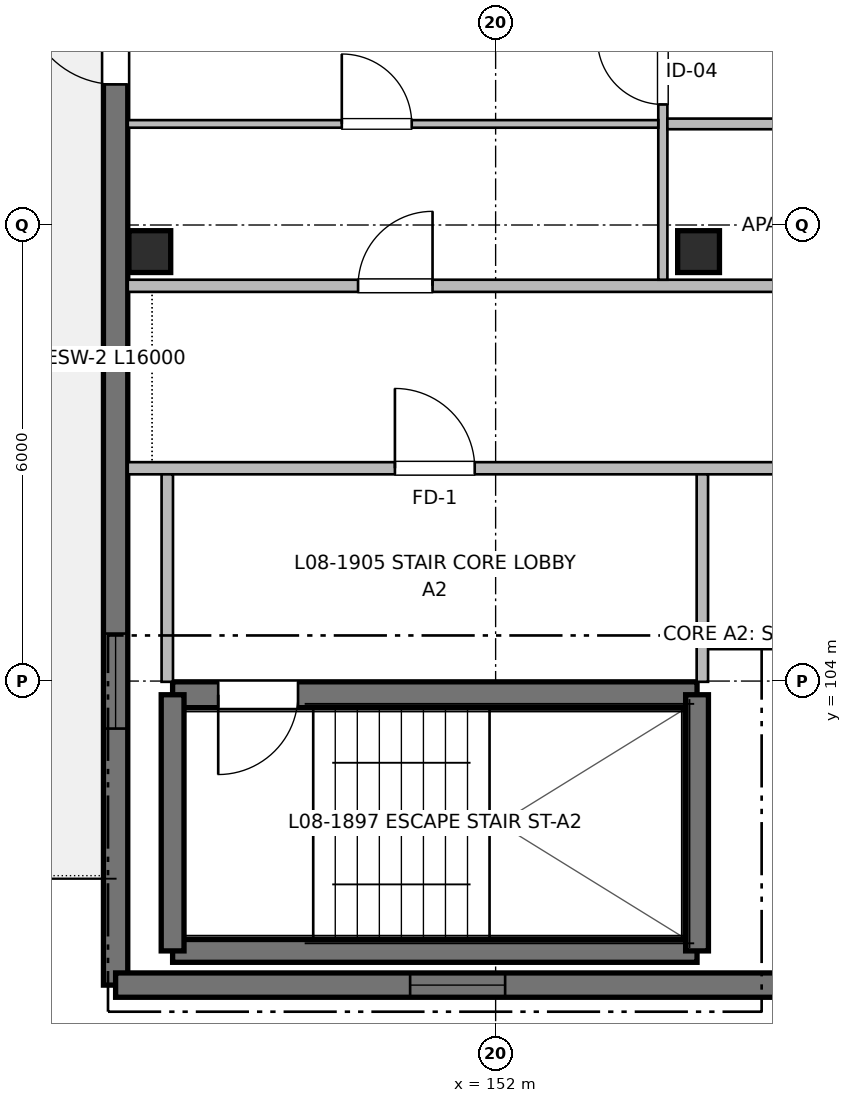
"""IFC4 building model, lengths in metres.
Left out: names, types, materials, properties, quantities, classifications, styles, units other than length and angle.
Written with IfcOpenShell. Run it as: python <this file> out.ifc"""

import sys

from ifc_helpers import new_model, si_unit, direction, frame, frame_2d, origin, origin_2d, place, context, subcontext, project, spatial, rectangle, extrude, element, fill, save


model = new_model("IFC4")
c1 = context("Model", 3, precision=1e-05, world=origin(), true_north=direction((0.0, 1.0)))
c2 = subcontext(c1, "Body", "Model", "MODEL_VIEW")
j1 = project(units=[si_unit("LENGTHUNIT", "METRE"), si_unit("PLANEANGLEUNIT", "RADIAN")], contexts=[c1])
p1 = place(None, origin())
s1 = spatial("IfcSite", under=j1, at=p1, CompositionType="ELEMENT")
p2 = place(p1, origin())
s2 = spatial("IfcBuilding", under=s1, at=p2, CompositionType="ELEMENT")
p3 = place(p2, frame((0.0, 0.0, 26.56)))
s3 = spatial("IfcBuildingStorey", under=s2, at=p3, CompositionType="ELEMENT", Elevation=26.56)
for number, where, z_axis, x_axis in (
    (1, (147.45, 109.65, 0.0), (0.0, 0.0, 1.0), (1.0, 0.0, 0.0)),
    (2, (154.67, 109.65, 0.0), (0.0, 0.0, 1.0), (1.0, 0.0, 0.0)),
):
    element("IfcColumn", number, at=place(p3, frame(where, z_axis=z_axis, x_axis=x_axis)), inside=s3, PredefinedType="COLUMN", context=c2, shape_type="SweptSolid", body=[
        extrude(rectangle(XDim=0.55, YDim=0.55, at=origin_2d()), origin(), (0.0, 0.0, 1.0), 3.2),
    ])
p4 = place(p3, frame((147.75, 100.45, 0.0), z_axis=(0.0, 0.0, 1.0), x_axis=(1.0, 0.0, 0.0)))
e3 = element("IfcWall", 3, at=p4, inside=s3, PredefinedType="SHEAR", context=c2, shape_type="SweptSolid", body=[
    extrude(rectangle(XDim=6.9, YDim=0.3, at=frame_2d((3.45, 0.0))), origin(), (0.0, 0.0, 1.0), 3.2),
])
p5 = place(p3, frame((154.65, 103.82, 0.0), z_axis=(0.0, 0.0, 1.0), x_axis=(-1.0, 0.0, 0.0)))
e4 = element("IfcWall", 4, at=p5, inside=s3, PredefinedType="SHEAR", context=c2, shape_type="SweptSolid", body=[
    extrude(rectangle(XDim=6.9, YDim=0.34, at=frame_2d((3.45, 0.0))), origin(), (0.0, 0.0, 1.0), 3.2),
])
p6 = place(p5, frame((5.25, 0.0, 0.0)))
e5 = element("IfcOpeningElement", 5, at=p6, cuts=e4, PredefinedType="OPENING", context=c2, shape_type="SweptSolid", body=[
    extrude(rectangle(XDim=1.05, YDim=2.15, at=frame_2d((0.525, 1.075))), frame((0.0, 0.18, 0.0), z_axis=(0.0, -1.0, 0.0), x_axis=(1.0, 0.0, 0.0)), (0.0, 0.0, 1.0), 0.36),
])
for number, where, z_axis, x_axis in (
    (6, (147.75, 103.82, 0.0), (0.0, 0.0, 1.0), (0.0, -1.0, 0.0)),
    (7, (154.65, 100.45, 0.0), (0.0, 0.0, 1.0), (0.0, 1.0, 0.0)),
):
    element("IfcWall", number, at=place(p3, frame(where, z_axis=z_axis, x_axis=x_axis)), inside=s3, PredefinedType="SHEAR", context=c2, shape_type="SweptSolid", body=[
        extrude(rectangle(XDim=3.37, YDim=0.3, at=frame_2d((1.685, 0.0))), origin(), (0.0, 0.0, 1.0), 3.2),
    ])
p7 = place(p3, frame((147.0, 100.0, 0.0), z_axis=(0.0, 0.0, 1.0), x_axis=(0.0, 1.0, 0.0)))
e8 = element("IfcWall", 8, at=p7, inside=s3, PredefinedType="SHEAR", context=c2, shape_type="SweptSolid", body=[
    extrude(rectangle(XDim=16.0, YDim=0.32, at=frame_2d((8.0, 0.0))), origin(), (0.0, 0.0, 1.0), 2.98),
])
p8 = place(p7, frame((3.375, 0.0, 0.87)))
e9 = element("IfcOpeningElement", 9, at=p8, cuts=e8, PredefinedType="OPENING", context=c2, shape_type="SweptSolid", body=[
    extrude(rectangle(XDim=1.25, YDim=1.35, at=frame_2d((0.625, 0.675))), frame((0.0, 0.17, 0.0), z_axis=(0.0, -1.0, 0.0), x_axis=(1.0, 0.0, 0.0)), (0.0, 0.0, 1.0), 0.34),
])
p9 = place(p7, frame((11.85, 0.0, 0.0)))
e10 = element("IfcOpeningElement", 10, at=p9, cuts=e8, PredefinedType="OPENING", context=c2, shape_type="SweptSolid", body=[
    extrude(rectangle(XDim=1.2, YDim=2.2, at=frame_2d((0.6, 1.1))), frame((0.0, 0.17, 0.0), z_axis=(0.0, -1.0, 0.0), x_axis=(1.0, 0.0, 0.0)), (0.0, 0.0, 1.0), 0.34),
])
p10 = place(p3, frame((156.0, 100.0, 0.0), z_axis=(0.0, 0.0, 1.0), x_axis=(-1.0, 0.0, 0.0)))
e11 = element("IfcWall", 11, at=p10, inside=s3, PredefinedType="SHEAR", context=c2, shape_type="SweptSolid", body=[
    extrude(rectangle(XDim=9.0, YDim=0.32, at=frame_2d((4.5, 0.0))), origin(), (0.0, 0.0, 1.0), 2.98),
])
p11 = place(p10, frame((3.875, 0.0, 0.87)))
e12 = element("IfcOpeningElement", 12, at=p11, cuts=e11, PredefinedType="OPENING", context=c2, shape_type="SweptSolid", body=[
    extrude(rectangle(XDim=1.25, YDim=1.35, at=frame_2d((0.625, 0.675))), frame((0.0, 0.17, 0.0), z_axis=(0.0, -1.0, 0.0), x_axis=(1.0, 0.0, 0.0)), (0.0, 0.0, 1.0), 0.34),
])
p12 = place(p3, frame((147.16, 106.8, 0.0), z_axis=(0.0, 0.0, 1.0), x_axis=(1.0, 0.0, 0.0)))
e13 = element("IfcWall", 13, at=p12, inside=s3, PredefinedType="PARTITIONING", context=c2, shape_type="SweptSolid", body=[
    extrude(rectangle(XDim=27.64, YDim=0.16, at=frame_2d((13.82, 0.0))), origin(), (0.0, 0.0, 1.0), 2.935),
])
p13 = place(p12, frame((3.515, 0.0, 0.0)))
e14 = element("IfcOpeningElement", 14, at=p13, cuts=e13, PredefinedType="OPENING", context=c2, shape_type="SweptSolid", body=[
    extrude(rectangle(XDim=1.05, YDim=2.15, at=frame_2d((0.525, 1.075))), frame((0.0, 0.09, 0.0), z_axis=(0.0, -1.0, 0.0), x_axis=(1.0, 0.0, 0.0)), (0.0, 0.0, 1.0), 0.18),
])
p14 = place(p12, frame((10.69, 0.0, 0.0)))
e15 = element("IfcOpeningElement", 15, at=p14, cuts=e13, PredefinedType="OPENING", context=c2, shape_type="SweptSolid", body=[
    extrude(rectangle(XDim=0.98, YDim=2.15, at=frame_2d((0.49, 1.075))), frame((0.0, 0.09, 0.0), z_axis=(0.0, -1.0, 0.0), x_axis=(1.0, 0.0, 0.0)), (0.0, 0.0, 1.0), 0.18),
])
p15 = place(p3, frame((147.16, 109.2, 0.0), z_axis=(0.0, 0.0, 1.0), x_axis=(1.0, 0.0, 0.0)))
e16 = element("IfcWall", 16, at=p15, inside=s3, PredefinedType="PARTITIONING", context=c2, shape_type="SweptSolid", body=[
    extrude(rectangle(XDim=36.68, YDim=0.16, at=frame_2d((18.34, 0.0))), origin(), (0.0, 0.0, 1.0), 2.935),
])
p16 = place(p15, frame((3.03, 0.0, 0.0)))
e17 = element("IfcOpeningElement", 17, at=p16, cuts=e16, PredefinedType="OPENING", context=c2, shape_type="SweptSolid", body=[
    extrude(rectangle(XDim=0.98, YDim=2.15, at=frame_2d((0.49, 1.075))), frame((0.0, 0.09, 0.0), z_axis=(0.0, -1.0, 0.0), x_axis=(1.0, 0.0, 0.0)), (0.0, 0.0, 1.0), 0.18),
])
p17 = place(p15, frame((15.72, 0.0, 0.0)))
e18 = element("IfcOpeningElement", 18, at=p17, cuts=e16, PredefinedType="OPENING", context=c2, shape_type="SweptSolid", body=[
    extrude(rectangle(XDim=0.98, YDim=2.15, at=frame_2d((0.49, 1.075))), frame((0.0, 0.09, 0.0), z_axis=(0.0, -1.0, 0.0), x_axis=(1.0, 0.0, 0.0)), (0.0, 0.0, 1.0), 0.18),
])
p18 = place(p15, frame((27.17, 0.0, 0.0)))
e19 = element("IfcOpeningElement", 19, at=p18, cuts=e16, PredefinedType="OPENING", context=c2, shape_type="SweptSolid", body=[
    extrude(rectangle(XDim=0.98, YDim=2.15, at=frame_2d((0.49, 1.075))), frame((0.0, 0.09, 0.0), z_axis=(0.0, -1.0, 0.0), x_axis=(1.0, 0.0, 0.0)), (0.0, 0.0, 1.0), 0.18),
])
for number, where, z_axis, x_axis in (
    (20, (147.68, 103.99, 0.0), (0.0, 0.0, 1.0), (0.0, 1.0, 0.0)),
    (21, (154.72, 103.99, 0.0), (0.0, 0.0, 1.0), (0.0, 1.0, 0.0)),
):
    element("IfcWall", number, at=place(p3, frame(where, z_axis=z_axis, x_axis=x_axis)), inside=s3, PredefinedType="PARTITIONING", context=c2, shape_type="SweptSolid", body=[
        extrude(rectangle(XDim=2.73, YDim=0.15, at=frame_2d((1.365, 0.0))), origin(), (0.0, 0.0, 1.0), 2.935),
    ])
p19 = place(p3, frame((154.2, 109.28, 0.0), z_axis=(0.0, 0.0, 1.0), x_axis=(0.0, 1.0, 0.0)))
e22 = element("IfcWall", 22, at=p19, inside=s3, PredefinedType="PARTITIONING", context=c2, shape_type="SweptSolid", body=[
    extrude(rectangle(XDim=6.6, YDim=0.12, at=frame_2d((3.3, 0.0))), origin(), (0.0, 0.0, 1.0), 2.935),
])
p20 = place(p19, frame((2.306, 0.0, 0.0)))
e23 = element("IfcOpeningElement", 23, at=p20, cuts=e22, PredefinedType="OPENING", context=c2, shape_type="SweptSolid", body=[
    extrude(rectangle(XDim=0.86, YDim=2.1, at=frame_2d((0.43, 1.05))), frame((0.0, 0.07, 0.0), z_axis=(0.0, -1.0, 0.0), x_axis=(1.0, 0.0, 0.0)), (0.0, 0.0, 1.0), 0.14),
])
p21 = place(p19, frame((4.097, 0.0, 0.0)))
e24 = element("IfcOpeningElement", 24, at=p21, cuts=e22, PredefinedType="OPENING", context=c2, shape_type="SweptSolid", body=[
    extrude(rectangle(XDim=0.9, YDim=2.1, at=frame_2d((0.45, 1.05))), frame((0.0, 0.07, 0.0), z_axis=(0.0, -1.0, 0.0), x_axis=(1.0, 0.0, 0.0)), (0.0, 0.0, 1.0), 0.14),
])
p22 = place(p3, frame((154.26, 111.33, 0.0), z_axis=(0.0, 0.0, 1.0), x_axis=(1.0, 0.0, 0.0)))
e25 = element("IfcWall", 25, at=p22, inside=s3, PredefinedType="PARTITIONING", context=c2, shape_type="SweptSolid", body=[
    extrude(rectangle(XDim=5.04, YDim=0.14, at=frame_2d((2.52, 0.0))), origin(), (0.0, 0.0, 1.0), 2.935),
])
p23 = place(p22, frame((2.04, 0.0, 0.0)))
e26 = element("IfcOpeningElement", 26, at=p23, cuts=e25, PredefinedType="OPENING", context=c2, shape_type="SweptSolid", body=[
    extrude(rectangle(XDim=0.85, YDim=2.05, at=frame_2d((0.425, 1.025))), frame((0.0, 0.08, 0.0), z_axis=(0.0, -1.0, 0.0), x_axis=(1.0, 0.0, 0.0)), (0.0, 0.0, 1.0), 0.16),
])
p24 = place(p3, frame((147.16, 111.33, 0.0), z_axis=(0.0, 0.0, 1.0), x_axis=(1.0, 0.0, 0.0)))
e27 = element("IfcWall", 27, at=p24, inside=s3, PredefinedType="PARTITIONING", context=c2, shape_type="SweptSolid", body=[
    extrude(rectangle(XDim=6.98, YDim=0.1, at=frame_2d((3.49, 0.0))), origin(), (0.0, 0.0, 1.0), 2.935),
])
p25 = place(p24, frame((2.816, 0.0, 0.0)))
e28 = element("IfcOpeningElement", 28, at=p25, cuts=e27, PredefinedType="OPENING", context=c2, shape_type="SweptSolid", body=[
    extrude(rectangle(XDim=0.92, YDim=2.1, at=frame_2d((0.46, 1.05))), frame((0.0, 0.06, 0.0), z_axis=(0.0, -1.0, 0.0), x_axis=(1.0, 0.0, 0.0)), (0.0, 0.0, 1.0), 0.12),
])
p26 = place(p3, frame((154.8, 104.47, 0.0), z_axis=(0.0, 0.0, 1.0), x_axis=(1.0, 0.0, 0.0)))
e29 = element("IfcWall", 29, at=p26, inside=s3, PredefinedType="PARTITIONING", context=c2, shape_type="SweptSolid", body=[
    extrude(rectangle(XDim=7.02, YDim=0.1, at=frame_2d((3.51, 0.0))), origin(), (0.0, 0.0, 1.0), 2.935),
])
p27 = place(p26, frame((2.974, 0.0, 0.0)))
e30 = element("IfcOpeningElement", 30, at=p27, cuts=e29, PredefinedType="OPENING", context=c2, shape_type="SweptSolid", body=[
    extrude(rectangle(XDim=0.92, YDim=2.1, at=frame_2d((0.46, 1.05))), frame((0.0, 0.06, 0.0), z_axis=(0.0, -1.0, 0.0), x_axis=(1.0, 0.0, 0.0)), (0.0, 0.0, 1.0), 0.12),
])
p28 = place(p6, origin())
e31 = element("IfcDoor", 31, at=p28, inside=s3, OperationType="SINGLE_SWING_RIGHT", PredefinedType="DOOR", context=c2, shape_type="SweptSolid", body=[
    extrude(rectangle(XDim=1.05, YDim=2.15, at=frame_2d((0.525, 1.075))), frame((0.0, 0.025, 0.0), z_axis=(0.0, -1.0, 0.0), x_axis=(1.0, 0.0, 0.0)), (0.0, 0.0, 1.0), 0.05),
])
fill(e5, e31)
p29 = place(p8, origin())
e32 = element("IfcWindow", 32, at=p29, inside=s3, PartitioningType="SINGLE_PANEL", PredefinedType="WINDOW", context=c2, shape_type="SweptSolid", body=[
    extrude(rectangle(XDim=1.25, YDim=1.35, at=frame_2d((0.625, 0.675))), frame((0.0, 0.03, 0.0), z_axis=(0.0, -1.0, 0.0), x_axis=(1.0, 0.0, 0.0)), (0.0, 0.0, 1.0), 0.06),
])
fill(e9, e32)
p30 = place(p9, origin())
e33 = element("IfcDoor", 33, at=p30, inside=s3, OperationType="SINGLE_SWING_RIGHT", PredefinedType="DOOR", context=c2, shape_type="SweptSolid", body=[
    extrude(rectangle(XDim=1.2, YDim=2.2, at=frame_2d((0.6, 1.1))), frame((0.0, 0.025, 0.0), z_axis=(0.0, -1.0, 0.0), x_axis=(1.0, 0.0, 0.0)), (0.0, 0.0, 1.0), 0.05),
])
fill(e10, e33)
p31 = place(p11, origin())
e34 = element("IfcWindow", 34, at=p31, inside=s3, PartitioningType="SINGLE_PANEL", PredefinedType="WINDOW", context=c2, shape_type="SweptSolid", body=[
    extrude(rectangle(XDim=1.25, YDim=1.35, at=frame_2d((0.625, 0.675))), frame((0.0, 0.03, 0.0), z_axis=(0.0, -1.0, 0.0), x_axis=(1.0, 0.0, 0.0)), (0.0, 0.0, 1.0), 0.06),
])
fill(e12, e34)
p32 = place(p13, origin())
e35 = element("IfcDoor", 35, at=p32, inside=s3, OperationType="SINGLE_SWING_LEFT", PredefinedType="DOOR", context=c2, shape_type="SweptSolid", body=[
    extrude(rectangle(XDim=1.05, YDim=2.15, at=frame_2d((0.525, 1.075))), frame((0.0, 0.025, 0.0), z_axis=(0.0, -1.0, 0.0), x_axis=(1.0, 0.0, 0.0)), (0.0, 0.0, 1.0), 0.05),
])
fill(e14, e35)
p33 = place(p16, origin())
e36 = element("IfcDoor", 36, at=p33, inside=s3, OperationType="SINGLE_SWING_RIGHT", PredefinedType="DOOR", context=c2, shape_type="SweptSolid", body=[
    extrude(rectangle(XDim=0.98, YDim=2.15, at=frame_2d((0.49, 1.075))), frame((0.0, 0.025, 0.0), z_axis=(0.0, -1.0, 0.0), x_axis=(1.0, 0.0, 0.0)), (0.0, 0.0, 1.0), 0.05),
])
fill(e17, e36)
p34 = place(p25, origin())
e37 = element("IfcDoor", 37, at=p34, inside=s3, OperationType="SINGLE_SWING_LEFT", PredefinedType="DOOR", context=c2, shape_type="SweptSolid", body=[
    extrude(rectangle(XDim=0.92, YDim=2.1, at=frame_2d((0.46, 1.05))), frame((0.0, 0.025, 0.0), z_axis=(0.0, -1.0, 0.0), x_axis=(1.0, 0.0, 0.0)), (0.0, 0.0, 1.0), 0.05),
])
fill(e28, e37)
p35 = place(p20, origin())
e38 = element("IfcDoor", 38, at=p35, inside=s3, OperationType="SINGLE_SWING_RIGHT", PredefinedType="DOOR", context=c2, shape_type="SweptSolid", body=[
    extrude(rectangle(XDim=0.86, YDim=2.1, at=frame_2d((0.43, 1.05))), frame((0.0, 0.025, 0.0), z_axis=(0.0, -1.0, 0.0), x_axis=(1.0, 0.0, 0.0)), (0.0, 0.0, 1.0), 0.05),
])
fill(e23, e38)
save(model, sys.argv[1])
